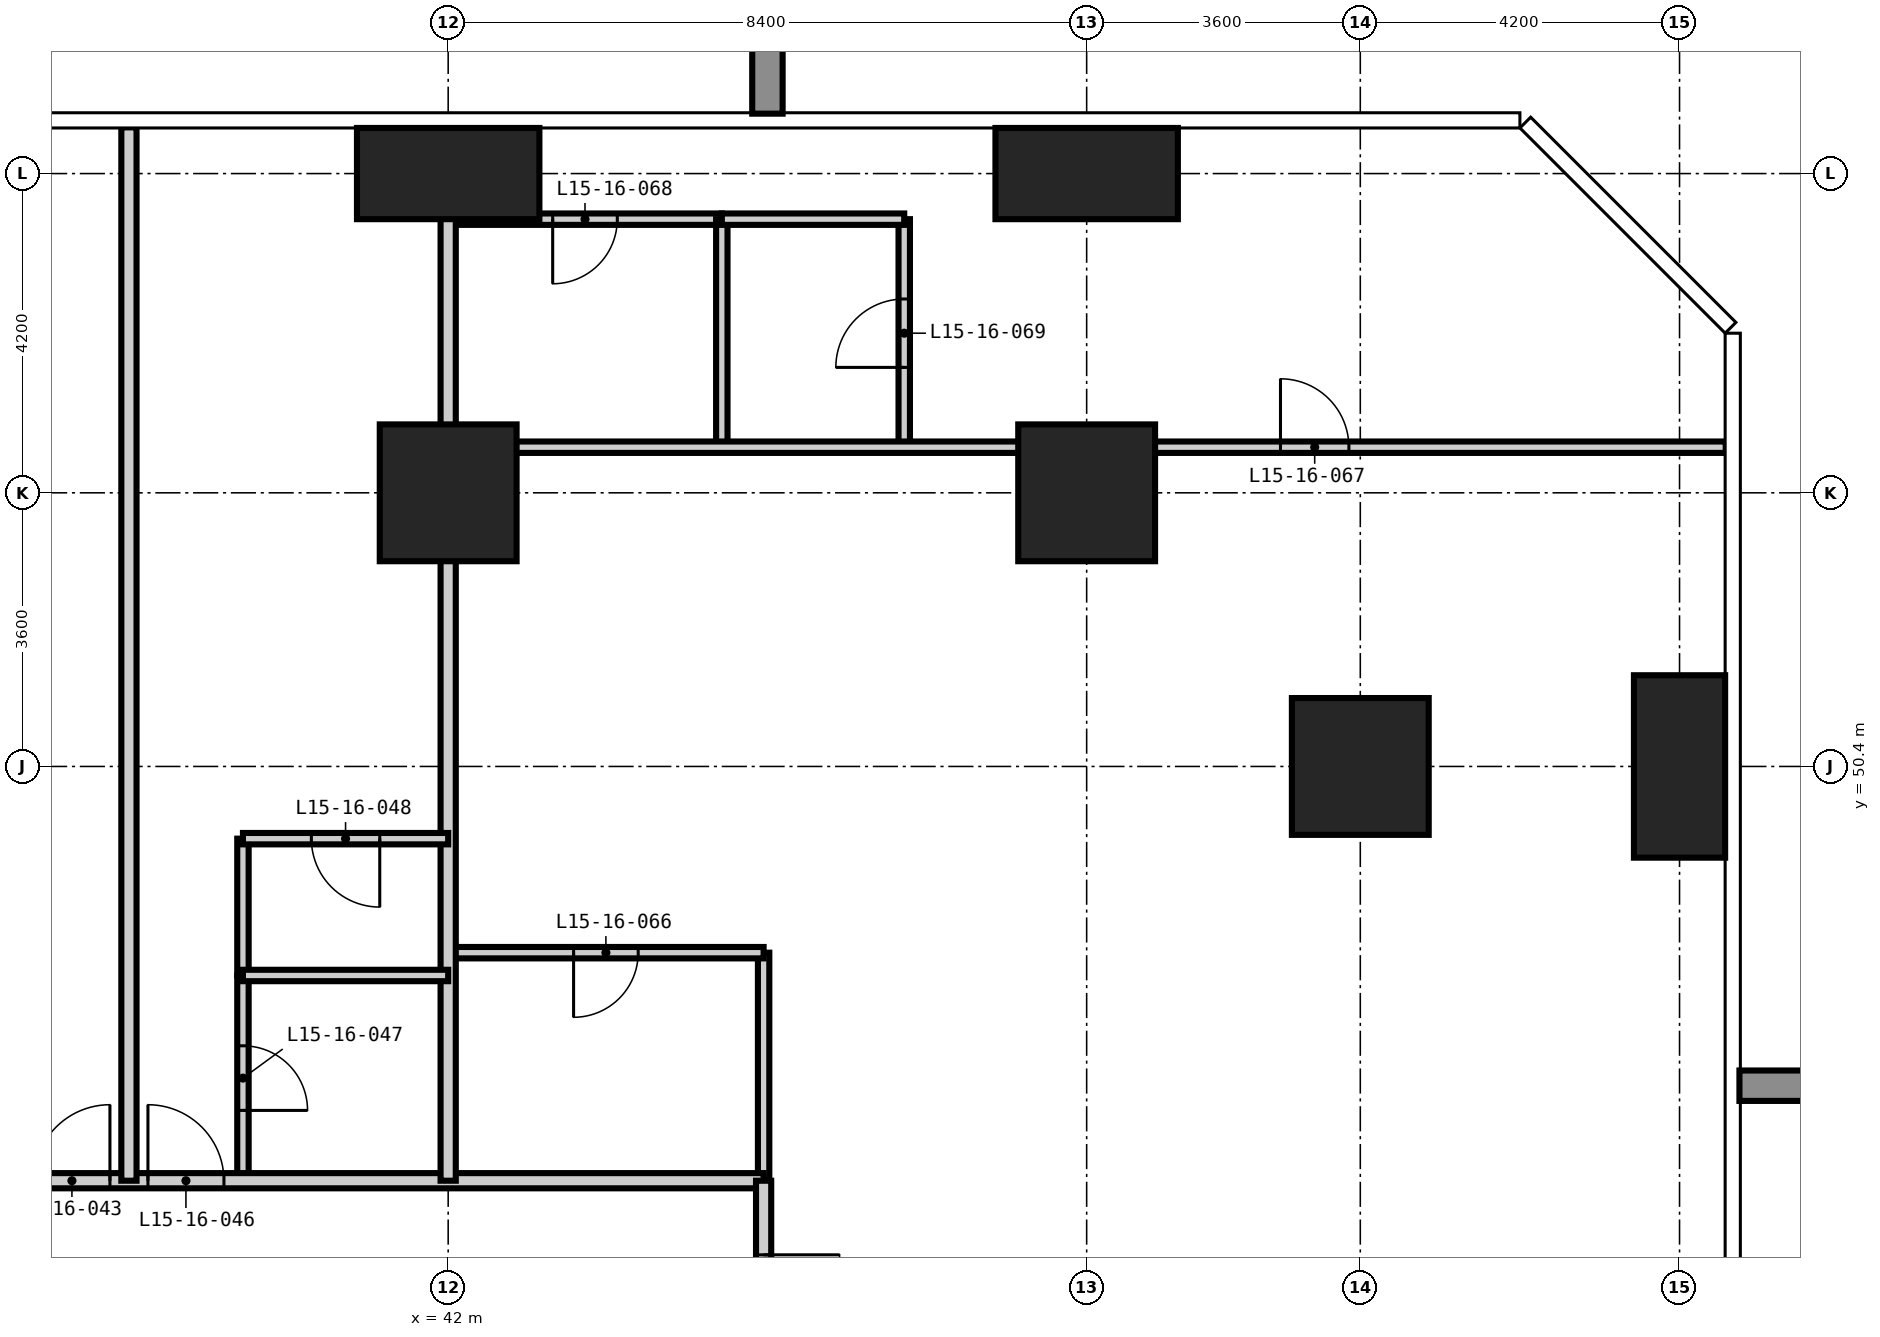
"""IFC4 building model, lengths in metres.
Left out: names, types, materials, properties, quantities, classifications, styles, units other than length and angle.
Written with IfcOpenShell. Run it as: python <this file> out.ifc"""

import sys

from ifc_helpers import new_model, si_unit, direction, frame, frame_2d, origin, origin_2d, place, context, subcontext, project, spatial, rectangle, extrude, element, fill, save


model = new_model("IFC4")
c1 = context("Model", 3, precision=1e-05, world=origin(), true_north=direction((0.0, 1.0)))
c2 = subcontext(c1, "Body", "Model", "MODEL_VIEW")
j1 = project(units=[si_unit("LENGTHUNIT", "METRE"), si_unit("PLANEANGLEUNIT", "RADIAN")], contexts=[c1])
p1 = place(None, origin())
s1 = spatial("IfcSite", under=j1, at=p1, CompositionType="ELEMENT")
p2 = place(p1, origin())
s2 = spatial("IfcBuilding", under=s1, at=p2, CompositionType="ELEMENT")
p3 = place(p2, frame((0.0, 0.0, 63.0)))
s3 = spatial("IfcBuildingStorey", under=s2, at=p3, CompositionType="ELEMENT", Elevation=63.0)
p4 = place(p3, frame((42.0, 54.0, -0.35), z_axis=(0.0, 0.0, 1.0), x_axis=(1.0, 0.0, 0.0)))
e1 = element("IfcColumn", 1, at=p4, inside=s3, PredefinedType="COLUMN", context=c2, shape_type="SweptSolid", body=[
    extrude(rectangle(XDim=1.8, YDim=1.8, at=origin_2d()), origin(), (0.0, 0.0, 1.0), 3.6),
])
p5 = place(p3, frame((42.0, 58.2, -0.35), z_axis=(0.0, 0.0, 1.0), x_axis=(1.0, 0.0, 0.0)))
e2 = element("IfcColumn", 2, at=p5, inside=s3, PredefinedType="COLUMN", context=c2, shape_type="SweptSolid", body=[
    extrude(rectangle(XDim=2.4, YDim=1.2, at=origin_2d()), origin(), (0.0, 0.0, 1.0), 3.6),
])
p6 = place(p3, frame((50.4, 54.0, -0.35), z_axis=(0.0, 0.0, 1.0), x_axis=(1.0, 0.0, 0.0)))
e3 = element("IfcColumn", 3, at=p6, inside=s3, PredefinedType="COLUMN", context=c2, shape_type="SweptSolid", body=[
    extrude(rectangle(XDim=1.8, YDim=1.8, at=origin_2d()), origin(), (0.0, 0.0, 1.0), 3.6),
])
p7 = place(p3, frame((50.4, 58.2, -0.35), z_axis=(0.0, 0.0, 1.0), x_axis=(1.0, 0.0, 0.0)))
e4 = element("IfcColumn", 4, at=p7, inside=s3, PredefinedType="COLUMN", context=c2, shape_type="SweptSolid", body=[
    extrude(rectangle(XDim=2.4, YDim=1.2, at=origin_2d()), origin(), (0.0, 0.0, 1.0), 3.6),
])
p8 = place(p3, frame((54.0, 50.4, -0.35), z_axis=(0.0, 0.0, 1.0), x_axis=(1.0, 0.0, 0.0)))
e5 = element("IfcColumn", 5, at=p8, inside=s3, PredefinedType="COLUMN", context=c2, shape_type="SweptSolid", body=[
    extrude(rectangle(XDim=1.8, YDim=1.8, at=origin_2d()), origin(), (0.0, 0.0, 1.0), 3.6),
])
p9 = place(p3, frame((58.2, 50.4, -0.35), z_axis=(0.0, 0.0, 1.0), x_axis=(1.0, 0.0, 0.0)))
e6 = element("IfcColumn", 6, at=p9, inside=s3, PredefinedType="COLUMN", context=c2, shape_type="SweptSolid", body=[
    extrude(rectangle(XDim=1.2, YDim=2.4, at=origin_2d()), origin(), (0.0, 0.0, 1.0), 3.6),
])
p10 = place(p3, frame((39.3, 44.95, 0.0), z_axis=(0.0, 0.0, 1.0), x_axis=(0.0, 1.0, 0.0)))
e7 = element("IfcWall", 7, at=p10, inside=s3, PredefinedType="PARTITIONING", context=c2, shape_type="SweptSolid", body=[
    extrude(rectangle(XDim=2.7, YDim=0.15, at=frame_2d((1.35, 0.0))), origin(), (0.0, 0.0, 1.0), 3.25),
])
p11 = place(p10, frame((0.925, 0.0, 0.0)))
e8 = element("IfcOpeningElement", 8, at=p11, cuts=e7, PredefinedType="OPENING", context=c2, shape_type="SweptSolid", body=[
    extrude(rectangle(XDim=0.85, YDim=2.1, at=frame_2d((0.425, 1.05))), frame((0.0, 0.085, 0.0), z_axis=(0.0, -1.0, 0.0), x_axis=(1.0, 0.0, 0.0)), (0.0, 0.0, 1.0), 0.17),
])
p12 = place(p3, frame((46.15, 44.95, 0.0), z_axis=(0.0, 0.0, 1.0), x_axis=(0.0, 1.0, 0.0)))
e9 = element("IfcWall", 9, at=p12, inside=s3, PredefinedType="PARTITIONING", context=c2, shape_type="SweptSolid", body=[
    extrude(rectangle(XDim=3.0, YDim=0.15, at=frame_2d((1.5, 0.0))), origin(), (0.0, 0.0, 1.0), 3.25),
])
p13 = place(p3, frame((42.0, 47.95, 0.0), z_axis=(0.0, 0.0, 1.0), x_axis=(1.0, 0.0, 0.0)))
e10 = element("IfcWall", 10, at=p13, inside=s3, PredefinedType="PARTITIONING", context=c2, shape_type="SweptSolid", body=[
    extrude(rectangle(XDim=4.15, YDim=0.15, at=frame_2d((2.075, 0.0))), origin(), (0.0, 0.0, 1.0), 3.25),
])
p14 = place(p13, frame((1.65, 0.0, 0.0)))
e11 = element("IfcOpeningElement", 11, at=p14, cuts=e10, PredefinedType="OPENING", context=c2, shape_type="SweptSolid", body=[
    extrude(rectangle(XDim=0.85, YDim=2.1, at=frame_2d((0.425, 1.05))), frame((0.0, 0.085, 0.0), z_axis=(0.0, -1.0, 0.0), x_axis=(1.0, 0.0, 0.0)), (0.0, 0.0, 1.0), 0.17),
])
p15 = place(p3, frame((42.0, 57.6, 0.0), z_axis=(0.0, 0.0, 1.0), x_axis=(1.0, 0.0, 0.0)))
e12 = element("IfcWall", 12, at=p15, inside=s3, PredefinedType="PARTITIONING", context=c2, shape_type="SweptSolid", body=[
    extrude(rectangle(XDim=3.6, YDim=0.15, at=frame_2d((1.8, 0.0))), origin(), (0.0, 0.0, 1.0), 3.25),
])
p16 = place(p15, frame((1.375, 0.0, 0.0)))
e13 = element("IfcOpeningElement", 13, at=p16, cuts=e12, PredefinedType="OPENING", context=c2, shape_type="SweptSolid", body=[
    extrude(rectangle(XDim=0.85, YDim=2.1, at=frame_2d((0.425, 1.05))), frame((0.0, 0.085, 0.0), z_axis=(0.0, -1.0, 0.0), x_axis=(1.0, 0.0, 0.0)), (0.0, 0.0, 1.0), 0.17),
])
p17 = place(p3, frame((13.25, 44.95, 0.0), z_axis=(0.0, 0.0, 1.0), x_axis=(1.0, 0.0, 0.0)))
e14 = element("IfcWall", 14, at=p17, inside=s3, PredefinedType="PARTITIONING", context=c2, shape_type="SweptSolid", body=[
    extrude(rectangle(XDim=32.9, YDim=0.2, at=frame_2d((16.45, 0.0))), origin(), (0.0, 0.0, 1.0), 3.25),
])
p18 = place(p17, frame((6.5, 0.0, 0.0)))
e15 = element("IfcOpeningElement", 15, at=p18, cuts=e14, PredefinedType="OPENING", context=c2, shape_type="SweptSolid", body=[
    extrude(rectangle(XDim=1.0, YDim=2.2, at=frame_2d((0.5, 1.1))), frame((0.0, 0.11, 0.0), z_axis=(0.0, -1.0, 0.0), x_axis=(1.0, 0.0, 0.0)), (0.0, 0.0, 1.0), 0.22),
])
p19 = place(p17, frame((8.0, 0.0, 0.0)))
e16 = element("IfcOpeningElement", 16, at=p19, cuts=e14, PredefinedType="OPENING", context=c2, shape_type="SweptSolid", body=[
    extrude(rectangle(XDim=1.0, YDim=2.2, at=frame_2d((0.5, 1.1))), frame((0.0, 0.11, 0.0), z_axis=(0.0, -1.0, 0.0), x_axis=(1.0, 0.0, 0.0)), (0.0, 0.0, 1.0), 0.22),
])
p20 = place(p17, frame((14.9, 0.0, 0.0)))
e17 = element("IfcOpeningElement", 17, at=p20, cuts=e14, PredefinedType="OPENING", context=c2, shape_type="SweptSolid", body=[
    extrude(rectangle(XDim=1.0, YDim=2.2, at=frame_2d((0.5, 1.1))), frame((0.0, 0.11, 0.0), z_axis=(0.0, -1.0, 0.0), x_axis=(1.0, 0.0, 0.0)), (0.0, 0.0, 1.0), 0.22),
])
p21 = place(p17, frame((16.4, 0.0, 0.0)))
e18 = element("IfcOpeningElement", 18, at=p21, cuts=e14, PredefinedType="OPENING", context=c2, shape_type="SweptSolid", body=[
    extrude(rectangle(XDim=1.0, YDim=2.2, at=frame_2d((0.5, 1.1))), frame((0.0, 0.11, 0.0), z_axis=(0.0, -1.0, 0.0), x_axis=(1.0, 0.0, 0.0)), (0.0, 0.0, 1.0), 0.22),
])
p22 = place(p17, frame((23.3, 0.0, 0.0)))
e19 = element("IfcOpeningElement", 19, at=p22, cuts=e14, PredefinedType="OPENING", context=c2, shape_type="SweptSolid", body=[
    extrude(rectangle(XDim=1.0, YDim=2.2, at=frame_2d((0.5, 1.1))), frame((0.0, 0.11, 0.0), z_axis=(0.0, -1.0, 0.0), x_axis=(1.0, 0.0, 0.0)), (0.0, 0.0, 1.0), 0.22),
])
p23 = place(p17, frame((24.8, 0.0, 0.0)))
e20 = element("IfcOpeningElement", 20, at=p23, cuts=e14, PredefinedType="OPENING", context=c2, shape_type="SweptSolid", body=[
    extrude(rectangle(XDim=1.0, YDim=2.2, at=frame_2d((0.5, 1.1))), frame((0.0, 0.11, 0.0), z_axis=(0.0, -1.0, 0.0), x_axis=(1.0, 0.0, 0.0)), (0.0, 0.0, 1.0), 0.22),
])
p24 = place(p3, frame((46.15, 44.95, 0.0), z_axis=(0.0, 0.0, 1.0), x_axis=(0.0, -1.0, 0.0)))
e21 = element("IfcWall", 21, at=p24, inside=s3, PredefinedType="PARTITIONING", context=c2, shape_type="SweptSolid", body=[
    extrude(rectangle(XDim=31.7, YDim=0.2, at=frame_2d((15.85, 0.0))), origin(), (0.0, 0.0, 1.0), 3.25),
])
p25 = place(p24, frame((24.65, 0.0, 0.0)))
e22 = element("IfcOpeningElement", 22, at=p25, cuts=e21, PredefinedType="OPENING", context=c2, shape_type="SweptSolid", body=[
    extrude(rectangle(XDim=1.0, YDim=2.2, at=frame_2d((0.5, 1.1))), frame((0.0, 0.11, 0.0), z_axis=(0.0, -1.0, 0.0), x_axis=(1.0, 0.0, 0.0)), (0.0, 0.0, 1.0), 0.22),
])
p26 = place(p24, frame((13.85, 0.0, 0.0)))
e23 = element("IfcOpeningElement", 23, at=p26, cuts=e21, PredefinedType="OPENING", context=c2, shape_type="SweptSolid", body=[
    extrude(rectangle(XDim=1.0, YDim=2.2, at=frame_2d((0.5, 1.1))), frame((0.0, 0.11, 0.0), z_axis=(0.0, -1.0, 0.0), x_axis=(1.0, 0.0, 0.0)), (0.0, 0.0, 1.0), 0.22),
])
p27 = place(p24, frame((7.85, 0.0, 0.0)))
e24 = element("IfcOpeningElement", 24, at=p27, cuts=e21, PredefinedType="OPENING", context=c2, shape_type="SweptSolid", body=[
    extrude(rectangle(XDim=1.0, YDim=2.2, at=frame_2d((0.5, 1.1))), frame((0.0, 0.11, 0.0), z_axis=(0.0, -1.0, 0.0), x_axis=(1.0, 0.0, 0.0)), (0.0, 0.0, 1.0), 0.22),
])
p28 = place(p24, frame((29.425, 0.0, 0.0)))
e25 = element("IfcOpeningElement", 25, at=p28, cuts=e21, PredefinedType="OPENING", context=c2, shape_type="SweptSolid", body=[
    extrude(rectangle(XDim=1.0, YDim=2.2, at=frame_2d((0.5, 1.1))), frame((0.0, 0.11, 0.0), z_axis=(0.0, -1.0, 0.0), x_axis=(1.0, 0.0, 0.0)), (0.0, 0.0, 1.0), 0.22),
])
p29 = place(p24, frame((0.975, 0.0, 0.0)))
e26 = element("IfcOpeningElement", 26, at=p29, cuts=e21, PredefinedType="OPENING", context=c2, shape_type="SweptSolid", body=[
    extrude(rectangle(XDim=1.0, YDim=2.2, at=frame_2d((0.5, 1.1))), frame((0.0, 0.11, 0.0), z_axis=(0.0, -1.0, 0.0), x_axis=(1.0, 0.0, 0.0)), (0.0, 0.0, 1.0), 0.22),
])
for number, where, z_axis, x_axis in (
    (27, (37.8, 44.95, 0.0), (0.0, 0.0, 1.0), (0.0, 1.0, 0.0)),
    (28, (42.0, 44.95, 0.0), (0.0, 0.0, 1.0), (0.0, 1.0, 0.0)),
):
    element("IfcWall", number, at=place(p3, frame(where, z_axis=z_axis, x_axis=x_axis)), inside=s3, PredefinedType="PARTITIONING", context=c2, shape_type="SweptSolid", body=[
        extrude(rectangle(XDim=13.858, YDim=0.2, at=frame_2d((6.929, 0.0))), origin(), (0.0, 0.0, 1.0), 3.25),
    ])
p30 = place(p3, frame((39.3, 47.65, 0.0), z_axis=(0.0, 0.0, 1.0), x_axis=(0.0, 1.0, 0.0)))
e29 = element("IfcWall", 29, at=p30, inside=s3, PredefinedType="PARTITIONING", context=c2, shape_type="SweptSolid", body=[
    extrude(rectangle(XDim=1.8, YDim=0.15, at=frame_2d((0.9, 0.0))), origin(), (0.0, 0.0, 1.0), 3.25),
])
p31 = place(p3, frame((45.6, 54.6, 0.0), z_axis=(0.0, 0.0, 1.0), x_axis=(0.0, 1.0, 0.0)))
e30 = element("IfcWall", 30, at=p31, inside=s3, PredefinedType="PARTITIONING", context=c2, shape_type="SweptSolid", body=[
    extrude(rectangle(XDim=3.0, YDim=0.15, at=frame_2d((1.5, 0.0))), origin(), (0.0, 0.0, 1.0), 3.25),
])
p32 = place(p3, frame((48.0, 54.6, 0.0), z_axis=(0.0, 0.0, 1.0), x_axis=(0.0, 1.0, 0.0)))
e31 = element("IfcWall", 31, at=p32, inside=s3, PredefinedType="PARTITIONING", context=c2, shape_type="SweptSolid", body=[
    extrude(rectangle(XDim=3.0, YDim=0.15, at=frame_2d((1.5, 0.0))), origin(), (0.0, 0.0, 1.0), 3.25),
])
p33 = place(p32, frame((1.05, 0.0, 0.0)))
e32 = element("IfcOpeningElement", 32, at=p33, cuts=e31, PredefinedType="OPENING", context=c2, shape_type="SweptSolid", body=[
    extrude(rectangle(XDim=0.9, YDim=2.1, at=frame_2d((0.45, 1.05))), frame((0.0, 0.085, 0.0), z_axis=(0.0, -1.0, 0.0), x_axis=(1.0, 0.0, 0.0)), (0.0, 0.0, 1.0), 0.17),
])
p34 = place(p3, frame((39.3, 47.65, 0.0), z_axis=(0.0, 0.0, 1.0), x_axis=(1.0, 0.0, 0.0)))
e33 = element("IfcWall", 33, at=p34, inside=s3, PredefinedType="PARTITIONING", context=c2, shape_type="SweptSolid", body=[
    extrude(rectangle(XDim=2.7, YDim=0.15, at=frame_2d((1.35, 0.0))), origin(), (0.0, 0.0, 1.0), 3.25),
])
p35 = place(p3, frame((39.3, 49.45, 0.0), z_axis=(0.0, 0.0, 1.0), x_axis=(1.0, 0.0, 0.0)))
e34 = element("IfcWall", 34, at=p35, inside=s3, PredefinedType="PARTITIONING", context=c2, shape_type="SweptSolid", body=[
    extrude(rectangle(XDim=2.7, YDim=0.15, at=frame_2d((1.35, 0.0))), origin(), (0.0, 0.0, 1.0), 3.25),
])
p36 = place(p35, frame((0.9, 0.0, 0.0)))
e35 = element("IfcOpeningElement", 35, at=p36, cuts=e34, PredefinedType="OPENING", context=c2, shape_type="SweptSolid", body=[
    extrude(rectangle(XDim=0.9, YDim=2.1, at=frame_2d((0.45, 1.05))), frame((0.0, 0.085, 0.0), z_axis=(0.0, -1.0, 0.0), x_axis=(1.0, 0.0, 0.0)), (0.0, 0.0, 1.0), 0.17),
])
p37 = place(p3, frame((42.0, 54.6, 0.0), z_axis=(0.0, 0.0, 1.0), x_axis=(1.0, 0.0, 0.0)))
e36 = element("IfcWall", 36, at=p37, inside=s3, PredefinedType="PARTITIONING", context=c2, shape_type="SweptSolid", body=[
    extrude(rectangle(XDim=16.808, YDim=0.15, at=frame_2d((8.404, 0.0))), origin(), (0.0, 0.0, 1.0), 3.25),
])
p38 = place(p37, frame((10.95, 0.0, 0.0)))
e37 = element("IfcOpeningElement", 37, at=p38, cuts=e36, PredefinedType="OPENING", context=c2, shape_type="SweptSolid", body=[
    extrude(rectangle(XDim=0.9, YDim=2.1, at=frame_2d((0.45, 1.05))), frame((0.0, 0.085, 0.0), z_axis=(0.0, -1.0, 0.0), x_axis=(1.0, 0.0, 0.0)), (0.0, 0.0, 1.0), 0.17),
])
p39 = place(p3, frame((45.6, 57.6, 0.0), z_axis=(0.0, 0.0, 1.0), x_axis=(1.0, 0.0, 0.0)))
e38 = element("IfcWall", 38, at=p39, inside=s3, PredefinedType="PARTITIONING", context=c2, shape_type="SweptSolid", body=[
    extrude(rectangle(XDim=2.4, YDim=0.15, at=frame_2d((1.2, 0.0))), origin(), (0.0, 0.0, 1.0), 3.25),
])
p40 = place(p22, origin())
e39 = element("IfcDoor", 39, at=p40, inside=s3, OperationType="SINGLE_SWING_RIGHT", PredefinedType="DOOR", context=c2, shape_type="SweptSolid", body=[
    extrude(rectangle(XDim=1.0, YDim=2.2, at=frame_2d((0.5, 1.1))), frame((0.0, 0.025, 0.0), z_axis=(0.0, -1.0, 0.0), x_axis=(1.0, 0.0, 0.0)), (0.0, 0.0, 1.0), 0.05),
])
fill(e19, e39)
p41 = place(p23, origin())
e40 = element("IfcDoor", 40, at=p41, inside=s3, OperationType="SINGLE_SWING_LEFT", PredefinedType="DOOR", context=c2, shape_type="SweptSolid", body=[
    extrude(rectangle(XDim=1.0, YDim=2.2, at=frame_2d((0.5, 1.1))), frame((0.0, 0.025, 0.0), z_axis=(0.0, -1.0, 0.0), x_axis=(1.0, 0.0, 0.0)), (0.0, 0.0, 1.0), 0.05),
])
fill(e20, e40)
p42 = place(p11, frame((0.85, 0.0, 0.0), z_axis=(0.0, 0.0, 1.0), x_axis=(-1.0, 0.0, 0.0)))
e41 = element("IfcDoor", 41, at=p42, inside=s3, OperationType="SINGLE_SWING_RIGHT", PredefinedType="DOOR", context=c2, shape_type="SweptSolid", body=[
    extrude(rectangle(XDim=0.85, YDim=2.1, at=frame_2d((0.425, 1.05))), frame((0.0, 0.025, 0.0), z_axis=(0.0, -1.0, 0.0), x_axis=(1.0, 0.0, 0.0)), (0.0, 0.0, 1.0), 0.05),
])
fill(e8, e41)
p43 = place(p36, frame((0.9, 0.0, 0.0), z_axis=(0.0, 0.0, 1.0), x_axis=(-1.0, 0.0, 0.0)))
e42 = element("IfcDoor", 42, at=p43, inside=s3, OperationType="SINGLE_SWING_LEFT", PredefinedType="DOOR", context=c2, shape_type="SweptSolid", body=[
    extrude(rectangle(XDim=0.9, YDim=2.1, at=frame_2d((0.45, 1.05))), frame((0.0, 0.025, 0.0), z_axis=(0.0, -1.0, 0.0), x_axis=(1.0, 0.0, 0.0)), (0.0, 0.0, 1.0), 0.05),
])
fill(e35, e42)
p44 = place(p29, origin())
e43 = element("IfcDoor", 43, at=p44, inside=s3, OperationType="SINGLE_SWING_LEFT", PredefinedType="DOOR", context=c2, shape_type="SweptSolid", body=[
    extrude(rectangle(XDim=1.0, YDim=2.2, at=frame_2d((0.5, 1.1))), frame((0.0, 0.025, 0.0), z_axis=(0.0, -1.0, 0.0), x_axis=(1.0, 0.0, 0.0)), (0.0, 0.0, 1.0), 0.05),
])
fill(e26, e43)
p45 = place(p14, frame((0.85, 0.0, 0.0), z_axis=(0.0, 0.0, 1.0), x_axis=(-1.0, 0.0, 0.0)))
e44 = element("IfcDoor", 44, at=p45, inside=s3, OperationType="SINGLE_SWING_RIGHT", PredefinedType="DOOR", context=c2, shape_type="SweptSolid", body=[
    extrude(rectangle(XDim=0.85, YDim=2.1, at=frame_2d((0.425, 1.05))), frame((0.0, 0.025, 0.0), z_axis=(0.0, -1.0, 0.0), x_axis=(1.0, 0.0, 0.0)), (0.0, 0.0, 1.0), 0.05),
])
fill(e11, e44)
p46 = place(p38, origin())
e45 = element("IfcDoor", 45, at=p46, inside=s3, OperationType="SINGLE_SWING_LEFT", PredefinedType="DOOR", context=c2, shape_type="SweptSolid", body=[
    extrude(rectangle(XDim=0.9, YDim=2.1, at=frame_2d((0.45, 1.05))), frame((0.0, 0.025, 0.0), z_axis=(0.0, -1.0, 0.0), x_axis=(1.0, 0.0, 0.0)), (0.0, 0.0, 1.0), 0.05),
])
fill(e37, e45)
p47 = place(p16, frame((0.85, 0.0, 0.0), z_axis=(0.0, 0.0, 1.0), x_axis=(-1.0, 0.0, 0.0)))
e46 = element("IfcDoor", 46, at=p47, inside=s3, OperationType="SINGLE_SWING_RIGHT", PredefinedType="DOOR", context=c2, shape_type="SweptSolid", body=[
    extrude(rectangle(XDim=0.85, YDim=2.1, at=frame_2d((0.425, 1.05))), frame((0.0, 0.025, 0.0), z_axis=(0.0, -1.0, 0.0), x_axis=(1.0, 0.0, 0.0)), (0.0, 0.0, 1.0), 0.05),
])
fill(e13, e46)
p48 = place(p33, origin())
e47 = element("IfcDoor", 47, at=p48, inside=s3, OperationType="SINGLE_SWING_LEFT", PredefinedType="DOOR", context=c2, shape_type="SweptSolid", body=[
    extrude(rectangle(XDim=0.9, YDim=2.1, at=frame_2d((0.45, 1.05))), frame((0.0, 0.025, 0.0), z_axis=(0.0, -1.0, 0.0), x_axis=(1.0, 0.0, 0.0)), (0.0, 0.0, 1.0), 0.05),
])
fill(e32, e47)
save(model, sys.argv[1])
